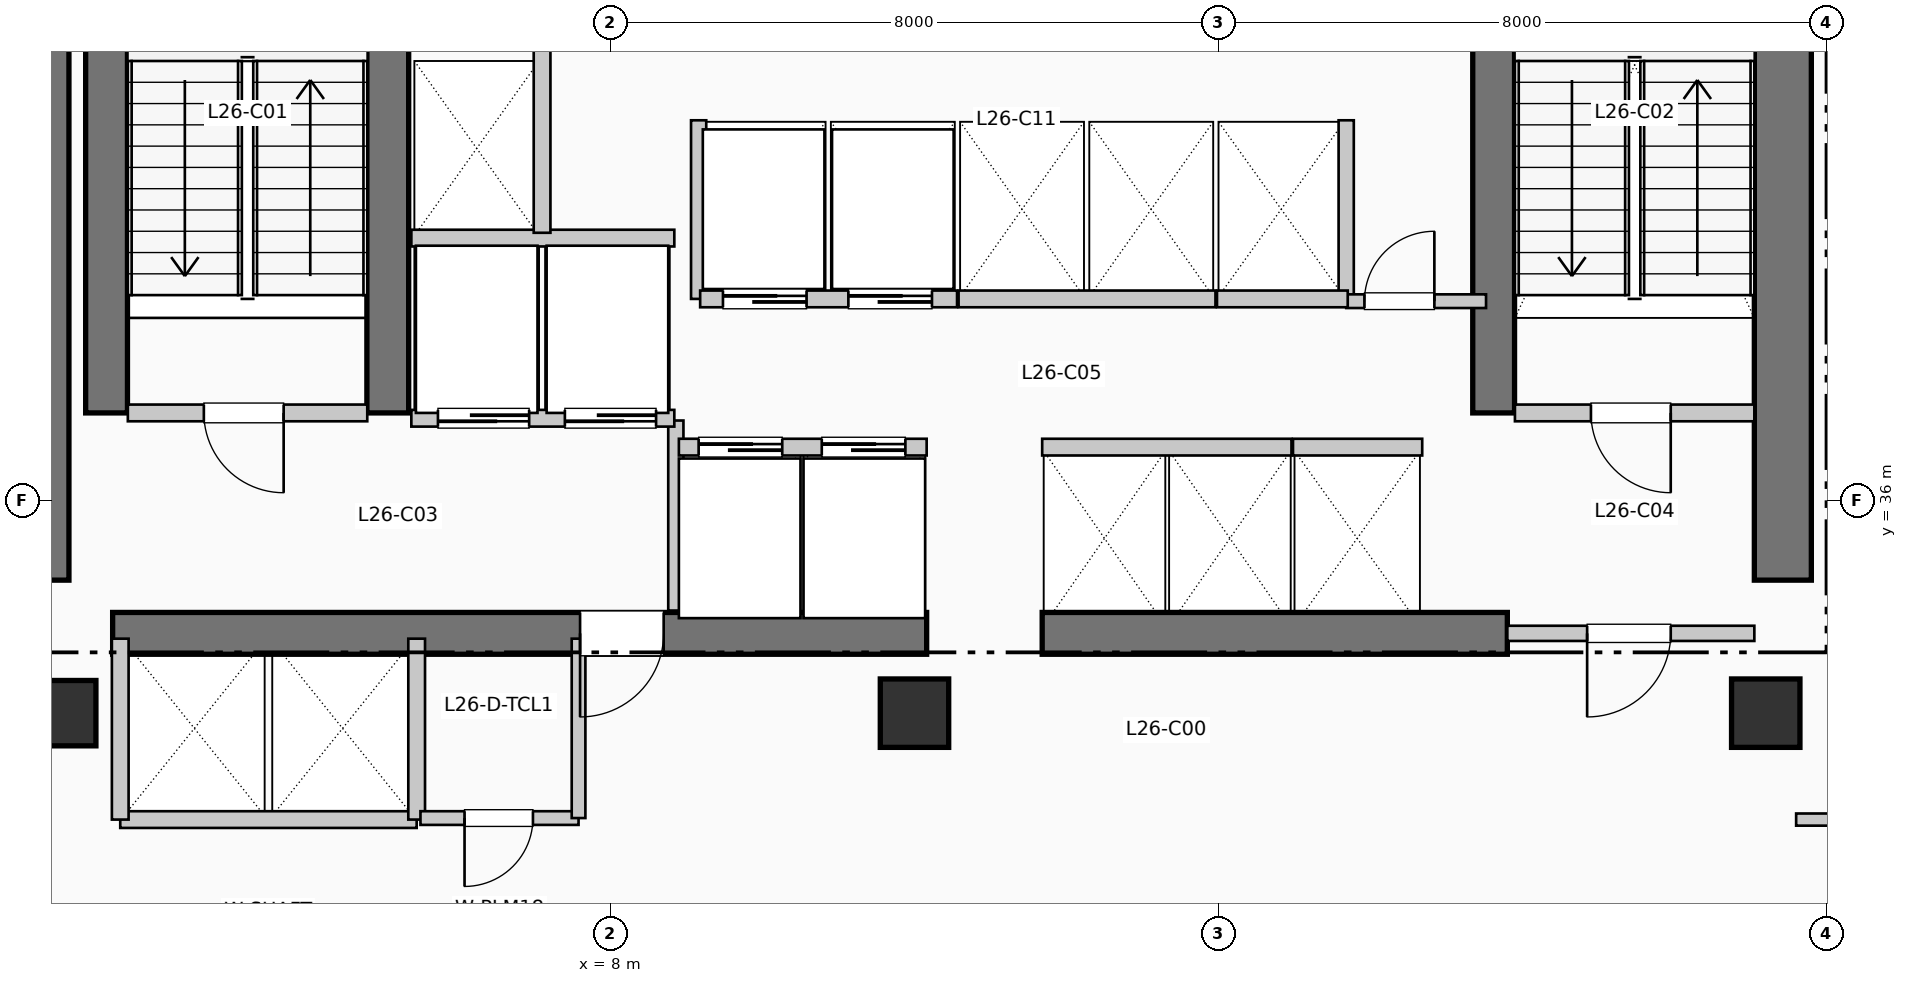
"""IFC4 building model, lengths in metres.
Left out: names, types, materials, properties, quantities, classifications, styles, units other than length and angle.
Written with IfcOpenShell. Run it as: python <this file> out.ifc"""

import sys

from ifc_helpers import new_model, si_unit, direction, frame, frame_2d, origin, origin_2d, place, context, subcontext, project, spatial, rectangle, extrude, element, fill, save


model = new_model("IFC4")
c1 = context("Model", 3, precision=1e-05, world=origin(), true_north=direction((0.0, 1.0)))
c2 = subcontext(c1, "Body", "Model", "MODEL_VIEW")
j1 = project(units=[si_unit("LENGTHUNIT", "METRE"), si_unit("PLANEANGLEUNIT", "RADIAN")], contexts=[c1])
p1 = place(None, origin())
s1 = spatial("IfcSite", under=j1, at=p1, CompositionType="ELEMENT")
p2 = place(p1, origin())
s2 = spatial("IfcBuilding", under=s1, at=p2, CompositionType="ELEMENT")
p3 = place(p2, frame((0.0, 0.0, 110.55)))
s3 = spatial("IfcBuildingStorey", under=s2, at=p3, CompositionType="ELEMENT", Elevation=110.55)
p4 = place(p3, frame((0.5, 34.95, 0.0), z_axis=(0.0, 0.0, 1.0), x_axis=(0.0, 1.0, 0.0)))
e1 = element("IfcWall", 1, at=p4, inside=s3, PredefinedType="SHEAR", context=c2, shape_type="SweptSolid", body=[
    extrude(rectangle(XDim=7.9, YDim=0.75, at=frame_2d((3.95, 0.0))), origin(), (0.0, 0.0, 1.0), 3.96),
])
p5 = place(p3, frame((23.425, 34.95, 0.0), z_axis=(0.0, 0.0, 1.0), x_axis=(0.0, 1.0, 0.0)))
e2 = element("IfcWall", 2, at=p5, inside=s3, PredefinedType="SHEAR", context=c2, shape_type="SweptSolid", body=[
    extrude(rectangle(XDim=10.64, YDim=0.75, at=frame_2d((5.32, 0.0))), origin(), (0.0, 0.0, 1.0), 3.96),
])
p6 = place(p3, frame((1.45, 34.25, 0.0), z_axis=(0.0, 0.0, 1.0), x_axis=(1.0, 0.0, 0.0)))
e3 = element("IfcWall", 3, at=p6, inside=s3, PredefinedType="SHEAR", context=c2, shape_type="SweptSolid", body=[
    extrude(rectangle(XDim=10.71, YDim=0.55, at=frame_2d((5.355, 0.0))), origin(), (0.0, 0.0, 1.0), 3.96),
])
p7 = place(p6, frame((7.25, 0.0, 0.0), z_axis=(0.0, 0.0, 1.0), x_axis=(-1.0, 0.0, 0.0)))
e4 = element("IfcOpeningElement", 4, at=p7, cuts=e3, PredefinedType="OPENING", context=c2, shape_type="SweptSolid", body=[
    extrude(rectangle(XDim=1.1, YDim=2.15, at=frame_2d((0.55, 1.075))), frame((0.0, 0.285, 0.0), z_axis=(0.0, -1.0, 0.0), x_axis=(1.0, 0.0, 0.0)), (0.0, 0.0, 1.0), 0.57),
])
p8 = place(p3, frame((13.68, 34.25, 0.0), z_axis=(0.0, 0.0, 1.0), x_axis=(1.0, 0.0, 0.0)))
e5 = element("IfcWall", 5, at=p8, inside=s3, PredefinedType="SHEAR", context=c2, shape_type="SweptSolid", body=[
    extrude(rectangle(XDim=6.12, YDim=0.55, at=frame_2d((3.06, 0.0))), origin(), (0.0, 0.0, 1.0), 3.96),
])
for number, where, z_axis, x_axis in (
    (6, (1.37, 37.15, 0.0), (0.0, 0.0, 1.0), (0.0, 1.0, 0.0)),
    (7, (5.07, 37.15, 0.0), (0.0, 0.0, 1.0), (0.0, 1.0, 0.0)),
    (8, (19.62, 37.15, 0.0), (0.0, 0.0, 1.0), (0.0, 1.0, 0.0)),
):
    element("IfcWall", number, at=place(p3, frame(where, z_axis=z_axis, x_axis=x_axis)), inside=s3, PredefinedType="SHEAR", context=c2, shape_type="SweptSolid", body=[
        extrude(rectangle(XDim=7.89, YDim=0.55, at=frame_2d((3.945, 0.0))), origin(), (0.0, 0.0, 1.0), 3.96),
    ])
p9 = place(p3, frame((0.8, 33.2, 0.0), z_axis=(0.0, 0.0, 1.0), x_axis=(1.0, 0.0, 0.0)))
e9 = element("IfcColumn", 9, at=p9, inside=s3, PredefinedType="COLUMN", context=c2, shape_type="SweptSolid", body=[
    extrude(rectangle(XDim=0.86, YDim=0.86, at=origin_2d()), origin(), (0.0, 0.0, 1.0), 3.96),
])
for number, where, z_axis, x_axis in (
    (10, (12.0, 33.2, 0.0), (0.0, 0.0, 1.0), (1.0, 0.0, 0.0)),
    (11, (23.2, 33.2, 0.0), (0.0, 0.0, 1.0), (1.0, 0.0, 0.0)),
):
    element("IfcColumn", number, at=place(p3, frame(where, z_axis=z_axis, x_axis=x_axis)), inside=s3, PredefinedType="COLUMN", context=c2, shape_type="SweptSolid", body=[
        extrude(rectangle(XDim=0.9, YDim=0.9, at=origin_2d()), origin(), (0.0, 0.0, 1.0), 3.96),
    ])
p10 = place(p3, frame((1.65, 37.15, 0.0), z_axis=(0.0, 0.0, 1.0), x_axis=(1.0, 0.0, 0.0)))
e12 = element("IfcWall", 12, at=p10, inside=s3, PredefinedType="PARTITIONING", context=c2, shape_type="SweptSolid", body=[
    extrude(rectangle(XDim=3.15, YDim=0.22, at=frame_2d((1.575, 0.0))), origin(), (0.0, 0.0, 1.0), 3.71),
])
p11 = place(p10, frame((2.05, 0.0, 0.0), z_axis=(0.0, 0.0, 1.0), x_axis=(-1.0, 0.0, 0.0)))
e13 = element("IfcOpeningElement", 13, at=p11, cuts=e12, PredefinedType="OPENING", context=c2, shape_type="SweptSolid", body=[
    extrude(rectangle(XDim=1.05, YDim=2.15, at=frame_2d((0.525, 1.075))), frame((0.0, 0.12, 0.0), z_axis=(0.0, -1.0, 0.0), x_axis=(1.0, 0.0, 0.0)), (0.0, 0.0, 1.0), 0.24),
])
p12 = place(p3, frame((8.86, 34.55, 0.0), z_axis=(0.0, 0.0, 1.0), x_axis=(0.0, 1.0, 0.0)))
e14 = element("IfcWall", 14, at=p12, inside=s3, PredefinedType="PARTITIONING", context=c2, shape_type="SweptSolid", body=[
    extrude(rectangle(XDim=2.5, YDim=0.2, at=frame_2d((1.25, 0.0))), origin(), (0.0, 0.0, 1.0), 3.71),
])
p13 = place(p3, frame((19.9, 37.15, 0.0), z_axis=(0.0, 0.0, 1.0), x_axis=(1.0, 0.0, 0.0)))
e15 = element("IfcWall", 15, at=p13, inside=s3, PredefinedType="PARTITIONING", context=c2, shape_type="SweptSolid", body=[
    extrude(rectangle(XDim=3.15, YDim=0.22, at=frame_2d((1.575, 0.0))), origin(), (0.0, 0.0, 1.0), 3.71),
])
p14 = place(p13, frame((2.05, 0.0, 0.0), z_axis=(0.0, 0.0, 1.0), x_axis=(-1.0, 0.0, 0.0)))
e16 = element("IfcOpeningElement", 16, at=p14, cuts=e15, PredefinedType="OPENING", context=c2, shape_type="SweptSolid", body=[
    extrude(rectangle(XDim=1.05, YDim=2.15, at=frame_2d((0.525, 1.075))), frame((0.0, 0.12, 0.0), z_axis=(0.0, -1.0, 0.0), x_axis=(1.0, 0.0, 0.0)), (0.0, 0.0, 1.0), 0.24),
])
p15 = place(p3, frame((19.8, 34.25, 0.0), z_axis=(0.0, 0.0, 1.0), x_axis=(1.0, 0.0, 0.0)))
e17 = element("IfcWall", 17, at=p15, inside=s3, PredefinedType="PARTITIONING", context=c2, shape_type="SweptSolid", body=[
    extrude(rectangle(XDim=3.25, YDim=0.2, at=frame_2d((1.625, 0.0))), origin(), (0.0, 0.0, 1.0), 3.71),
])
p16 = place(p15, frame((2.15, 0.0, 0.0), z_axis=(0.0, 0.0, 1.0), x_axis=(-1.0, 0.0, 0.0)))
e18 = element("IfcOpeningElement", 18, at=p16, cuts=e17, PredefinedType="OPENING", context=c2, shape_type="SweptSolid", body=[
    extrude(rectangle(XDim=1.1, YDim=2.15, at=frame_2d((0.55, 1.075))), frame((0.0, 0.11, 0.0), z_axis=(0.0, -1.0, 0.0), x_axis=(1.0, 0.0, 0.0)), (0.0, 0.0, 1.0), 0.22),
])
p17 = place(p3, frame((5.38, 37.08, 0.0), z_axis=(0.0, 0.0, 1.0), x_axis=(1.0, 0.0, 0.0)))
e19 = element("IfcWall", 19, at=p17, inside=s3, PredefinedType="PARTITIONING", context=c2, shape_type="SweptSolid", body=[
    extrude(rectangle(XDim=3.46, YDim=0.22, at=frame_2d((1.73, 0.0))), origin(), (0.0, 0.0, 1.0), 3.71),
])
p18 = place(p17, frame((1.55, 0.0, 0.0), z_axis=(0.0, 0.0, 1.0), x_axis=(-1.0, 0.0, 0.0)))
e20 = element("IfcOpeningElement", 20, at=p18, cuts=e19, PredefinedType="OPENING", context=c2, shape_type="SweptSolid", body=[
    extrude(rectangle(XDim=1.2, YDim=2.2, at=frame_2d((0.6, 1.1))), frame((0.0, 0.12, 0.0), z_axis=(0.0, -1.0, 0.0), x_axis=(1.0, 0.0, 0.0)), (0.0, 0.0, 1.0), 0.24),
])
p19 = place(p17, frame((3.22, 0.0, 0.0), z_axis=(0.0, 0.0, 1.0), x_axis=(-1.0, 0.0, 0.0)))
e21 = element("IfcOpeningElement", 21, at=p19, cuts=e19, PredefinedType="OPENING", context=c2, shape_type="SweptSolid", body=[
    extrude(rectangle(XDim=1.2, YDim=2.2, at=frame_2d((0.6, 1.1))), frame((0.0, 0.12, 0.0), z_axis=(0.0, -1.0, 0.0), x_axis=(1.0, 0.0, 0.0)), (0.0, 0.0, 1.0), 0.24),
])
p20 = place(p3, frame((5.38, 39.45, 0.0), z_axis=(0.0, 0.0, 1.0), x_axis=(1.0, 0.0, 0.0)))
e22 = element("IfcWall", 22, at=p20, inside=s3, PredefinedType="PARTITIONING", context=c2, shape_type="SweptSolid", body=[
    extrude(rectangle(XDim=3.46, YDim=0.22, at=frame_2d((1.73, 0.0))), origin(), (0.0, 0.0, 1.0), 3.71),
])
p21 = place(p3, frame((7.1, 39.52, 0.0), z_axis=(0.0, 0.0, 1.0), x_axis=(0.0, 1.0, 0.0)))
e23 = element("IfcWall", 23, at=p21, inside=s3, PredefinedType="PARTITIONING", context=c2, shape_type="SweptSolid", body=[
    extrude(rectangle(XDim=2.93, YDim=0.22, at=frame_2d((1.465, 0.0))), origin(), (0.0, 0.0, 1.0), 3.71),
])
p22 = place(p3, frame((1.55, 31.8, 0.0), z_axis=(0.0, 0.0, 1.0), x_axis=(1.0, 0.0, 0.0)))
e24 = element("IfcWall", 24, at=p22, inside=s3, PredefinedType="PARTITIONING", context=c2, shape_type="SweptSolid", body=[
    extrude(rectangle(XDim=3.9, YDim=0.22, at=frame_2d((1.95, 0.0))), origin(), (0.0, 0.0, 1.0), 3.71),
])
for number, where, z_axis, x_axis in (
    (25, (1.55, 31.8, 0.0), (0.0, 0.0, 1.0), (0.0, 1.0, 0.0)),
    (26, (5.45, 31.8, 0.0), (0.0, 0.0, 1.0), (0.0, 1.0, 0.0)),
):
    element("IfcWall", number, at=place(p3, frame(where, z_axis=z_axis, x_axis=x_axis)), inside=s3, PredefinedType="PARTITIONING", context=c2, shape_type="SweptSolid", body=[
        extrude(rectangle(XDim=2.38, YDim=0.22, at=frame_2d((1.19, 0.0))), origin(), (0.0, 0.0, 1.0), 3.71),
    ])
for number, where, z_axis, x_axis in (
    (27, (9.16, 38.65, 0.0), (0.0, 0.0, 1.0), (0.0, 1.0, 0.0)),
    (28, (17.68, 38.65, 0.0), (0.0, 0.0, 1.0), (0.0, 1.0, 0.0)),
):
    element("IfcWall", number, at=place(p3, frame(where, z_axis=z_axis, x_axis=x_axis)), inside=s3, PredefinedType="PARTITIONING", context=c2, shape_type="SweptSolid", body=[
        extrude(rectangle(XDim=2.35, YDim=0.2, at=frame_2d((1.175, 0.0))), origin(), (0.0, 0.0, 1.0), 3.71),
    ])
p23 = place(p3, frame((17.68, 38.62, 0.0), z_axis=(0.0, 0.0, 1.0), x_axis=(1.0, 0.0, 0.0)))
e29 = element("IfcWall", 29, at=p23, inside=s3, PredefinedType="PARTITIONING", context=c2, shape_type="SweptSolid", body=[
    extrude(rectangle(XDim=1.84, YDim=0.18, at=frame_2d((0.92, 0.0))), origin(), (0.0, 0.0, 1.0), 3.71),
])
p24 = place(p23, frame((0.24, 0.0, 0.0)))
e30 = element("IfcOpeningElement", 30, at=p24, cuts=e29, PredefinedType="OPENING", context=c2, shape_type="SweptSolid", body=[
    extrude(rectangle(XDim=0.92, YDim=2.1, at=frame_2d((0.46, 1.05))), frame((0.0, 0.1, 0.0), z_axis=(0.0, -1.0, 0.0), x_axis=(1.0, 0.0, 0.0)), (0.0, 0.0, 1.0), 0.2),
])
p25 = place(p3, frame((5.5, 31.82, 0.0), z_axis=(0.0, 0.0, 1.0), x_axis=(1.0, 0.0, 0.0)))
e31 = element("IfcWall", 31, at=p25, inside=s3, PredefinedType="PLUMBINGWALL", context=c2, shape_type="SweptSolid", body=[
    extrude(rectangle(XDim=2.08, YDim=0.18, at=frame_2d((1.04, 0.0))), origin(), (0.0, 0.0, 1.0), 3.71),
])
p26 = place(p25, frame((1.48, 0.0, 0.0), z_axis=(0.0, 0.0, 1.0), x_axis=(-1.0, 0.0, 0.0)))
e32 = element("IfcOpeningElement", 32, at=p26, cuts=e31, PredefinedType="OPENING", context=c2, shape_type="SweptSolid", body=[
    extrude(rectangle(XDim=0.9, YDim=2.1, at=frame_2d((0.45, 1.05))), frame((0.0, 0.1, 0.0), z_axis=(0.0, -1.0, 0.0), x_axis=(1.0, 0.0, 0.0)), (0.0, 0.0, 1.0), 0.2),
])
p27 = place(p3, frame((7.58, 31.82, 0.0), z_axis=(0.0, 0.0, 1.0), x_axis=(0.0, 1.0, 0.0)))
e33 = element("IfcWall", 33, at=p27, inside=s3, PredefinedType="PLUMBINGWALL", context=c2, shape_type="SweptSolid", body=[
    extrude(rectangle(XDim=2.36, YDim=0.18, at=frame_2d((1.18, 0.0))), origin(), (0.0, 0.0, 1.0), 3.71),
])
p28 = place(p3, frame((8.9, 36.7, 0.0), z_axis=(0.0, 0.0, 1.0), x_axis=(1.0, 0.0, 0.0)))
e34 = element("IfcWall", 34, at=p28, inside=s3, PredefinedType="PARTITIONING", context=c2, shape_type="SweptSolid", body=[
    extrude(rectangle(XDim=3.26, YDim=0.22, at=frame_2d((1.63, 0.0))), origin(), (0.0, 0.0, 1.0), 3.71),
])
p29 = place(p28, frame((0.26, 0.0, 0.0)))
e35 = element("IfcOpeningElement", 35, at=p29, cuts=e34, PredefinedType="OPENING", context=c2, shape_type="SweptSolid", body=[
    extrude(rectangle(XDim=1.1, YDim=2.2, at=frame_2d((0.55, 1.1))), frame((0.0, 0.12, 0.0), z_axis=(0.0, -1.0, 0.0), x_axis=(1.0, 0.0, 0.0)), (0.0, 0.0, 1.0), 0.24),
])
p30 = place(p28, frame((1.88, 0.0, 0.0)))
e36 = element("IfcOpeningElement", 36, at=p30, cuts=e34, PredefinedType="OPENING", context=c2, shape_type="SweptSolid", body=[
    extrude(rectangle(XDim=1.1, YDim=2.2, at=frame_2d((0.55, 1.1))), frame((0.0, 0.12, 0.0), z_axis=(0.0, -1.0, 0.0), x_axis=(1.0, 0.0, 0.0)), (0.0, 0.0, 1.0), 0.24),
])
p31 = place(p3, frame((9.18, 38.65, 0.0), z_axis=(0.0, 0.0, 1.0), x_axis=(1.0, 0.0, 0.0)))
e37 = element("IfcWall", 37, at=p31, inside=s3, PredefinedType="PARTITIONING", context=c2, shape_type="SweptSolid", body=[
    extrude(rectangle(XDim=3.38, YDim=0.22, at=frame_2d((1.69, 0.0))), origin(), (0.0, 0.0, 1.0), 3.71),
])
p32 = place(p31, frame((0.3, 0.0, 0.0)))
e38 = element("IfcOpeningElement", 38, at=p32, cuts=e37, PredefinedType="OPENING", context=c2, shape_type="SweptSolid", body=[
    extrude(rectangle(XDim=1.1, YDim=2.2, at=frame_2d((0.55, 1.1))), frame((0.0, 0.12, 0.0), z_axis=(0.0, -1.0, 0.0), x_axis=(1.0, 0.0, 0.0)), (0.0, 0.0, 1.0), 0.24),
])
p33 = place(p31, frame((1.95, 0.0, 0.0)))
e39 = element("IfcOpeningElement", 39, at=p33, cuts=e37, PredefinedType="OPENING", context=c2, shape_type="SweptSolid", body=[
    extrude(rectangle(XDim=1.1, YDim=2.2, at=frame_2d((0.55, 1.1))), frame((0.0, 0.12, 0.0), z_axis=(0.0, -1.0, 0.0), x_axis=(1.0, 0.0, 0.0)), (0.0, 0.0, 1.0), 0.24),
])
p34 = place(p3, frame((13.68, 36.7, 0.0), z_axis=(0.0, 0.0, 1.0), x_axis=(1.0, 0.0, 0.0)))
e40 = element("IfcWall", 40, at=p34, inside=s3, PredefinedType="PARTITIONING", context=c2, shape_type="SweptSolid", body=[
    extrude(rectangle(XDim=3.28, YDim=0.22, at=frame_2d((1.64, 0.0))), origin(), (0.0, 0.0, 1.0), 3.71),
])
p35 = place(p3, frame((12.58, 38.65, 0.0), z_axis=(0.0, 0.0, 1.0), x_axis=(1.0, 0.0, 0.0)))
e41 = element("IfcWall", 41, at=p35, inside=s3, PredefinedType="PARTITIONING", context=c2, shape_type="SweptSolid", body=[
    extrude(rectangle(XDim=3.38, YDim=0.22, at=frame_2d((1.69, 0.0))), origin(), (0.0, 0.0, 1.0), 3.71),
])
p36 = place(p3, frame((16.98, 36.7, 0.0), z_axis=(0.0, 0.0, 1.0), x_axis=(1.0, 0.0, 0.0)))
e42 = element("IfcWall", 42, at=p36, inside=s3, PredefinedType="PARTITIONING", context=c2, shape_type="SweptSolid", body=[
    extrude(rectangle(XDim=1.7, YDim=0.22, at=frame_2d((0.85, 0.0))), origin(), (0.0, 0.0, 1.0), 3.71),
])
p37 = place(p3, frame((15.98, 38.65, 0.0), z_axis=(0.0, 0.0, 1.0), x_axis=(1.0, 0.0, 0.0)))
e43 = element("IfcWall", 43, at=p37, inside=s3, PredefinedType="PARTITIONING", context=c2, shape_type="SweptSolid", body=[
    extrude(rectangle(XDim=1.72, YDim=0.22, at=frame_2d((0.86, 0.0))), origin(), (0.0, 0.0, 1.0), 3.71),
])
p38 = place(p3, frame((23.6, 31.8, 0.0), z_axis=(0.0, 0.0, 1.0), x_axis=(1.0, 0.0, 0.0)))
e44 = element("IfcWall", 44, at=p38, inside=s3, PredefinedType="PARTITIONING", context=c2, shape_type="SweptSolid", body=[
    extrude(rectangle(XDim=26.41, YDim=0.16, at=frame_2d((13.205, 0.0))), origin(), (0.0, 0.0, 1.0), 3.71),
])
p39 = place(p38, frame((12.73, 0.0, 0.0)))
e45 = element("IfcOpeningElement", 45, at=p39, cuts=e44, PredefinedType="OPENING", context=c2, shape_type="SweptSolid", body=[
    extrude(rectangle(XDim=0.95, YDim=2.15, at=frame_2d((0.475, 1.075))), frame((0.0, 0.09, 0.0), z_axis=(0.0, -1.0, 0.0), x_axis=(1.0, 0.0, 0.0)), (0.0, 0.0, 1.0), 0.18),
])
p40 = place(p11, origin())
e46 = element("IfcDoor", 46, at=p40, inside=s3, OperationType="SINGLE_SWING_RIGHT", PredefinedType="DOOR", context=c2, shape_type="SweptSolid", body=[
    extrude(rectangle(XDim=1.05, YDim=2.15, at=frame_2d((0.525, 1.075))), frame((0.0, 0.025, 0.0), z_axis=(0.0, -1.0, 0.0), x_axis=(1.0, 0.0, 0.0)), (0.0, 0.0, 1.0), 0.05),
])
fill(e13, e46)
p41 = place(p7, origin())
e47 = element("IfcDoor", 47, at=p41, inside=s3, OperationType="SINGLE_SWING_LEFT", PredefinedType="DOOR", context=c2, shape_type="SweptSolid", body=[
    extrude(rectangle(XDim=1.1, YDim=2.15, at=frame_2d((0.55, 1.075))), frame((0.0, 0.025, 0.0), z_axis=(0.0, -1.0, 0.0), x_axis=(1.0, 0.0, 0.0)), (0.0, 0.0, 1.0), 0.05),
])
fill(e4, e47)
p42 = place(p14, origin())
e48 = element("IfcDoor", 48, at=p42, inside=s3, OperationType="SINGLE_SWING_RIGHT", PredefinedType="DOOR", context=c2, shape_type="SweptSolid", body=[
    extrude(rectangle(XDim=1.05, YDim=2.15, at=frame_2d((0.525, 1.075))), frame((0.0, 0.025, 0.0), z_axis=(0.0, -1.0, 0.0), x_axis=(1.0, 0.0, 0.0)), (0.0, 0.0, 1.0), 0.05),
])
fill(e16, e48)
p43 = place(p16, origin())
e49 = element("IfcDoor", 49, at=p43, inside=s3, OperationType="SINGLE_SWING_LEFT", PredefinedType="DOOR", context=c2, shape_type="SweptSolid", body=[
    extrude(rectangle(XDim=1.1, YDim=2.15, at=frame_2d((0.55, 1.075))), frame((0.0, 0.025, 0.0), z_axis=(0.0, -1.0, 0.0), x_axis=(1.0, 0.0, 0.0)), (0.0, 0.0, 1.0), 0.05),
])
fill(e18, e49)
p44 = place(p18, origin())
e50 = element("IfcDoor", 50, at=p44, inside=s3, OperationType="SLIDING_TO_RIGHT", PredefinedType="DOOR", context=c2, shape_type="SweptSolid", body=[
    extrude(rectangle(XDim=1.2, YDim=2.2, at=frame_2d((0.6, 1.1))), frame((0.0, 0.025, 0.0), z_axis=(0.0, -1.0, 0.0), x_axis=(1.0, 0.0, 0.0)), (0.0, 0.0, 1.0), 0.05),
])
fill(e20, e50)
p45 = place(p19, origin())
e51 = element("IfcDoor", 51, at=p45, inside=s3, OperationType="SLIDING_TO_RIGHT", PredefinedType="DOOR", context=c2, shape_type="SweptSolid", body=[
    extrude(rectangle(XDim=1.2, YDim=2.2, at=frame_2d((0.6, 1.1))), frame((0.0, 0.025, 0.0), z_axis=(0.0, -1.0, 0.0), x_axis=(1.0, 0.0, 0.0)), (0.0, 0.0, 1.0), 0.05),
])
fill(e21, e51)
p46 = place(p24, origin())
e52 = element("IfcDoor", 52, at=p46, inside=s3, OperationType="SINGLE_SWING_RIGHT", PredefinedType="DOOR", context=c2, shape_type="SweptSolid", body=[
    extrude(rectangle(XDim=0.92, YDim=2.1, at=frame_2d((0.46, 1.05))), frame((0.0, 0.025, 0.0), z_axis=(0.0, -1.0, 0.0), x_axis=(1.0, 0.0, 0.0)), (0.0, 0.0, 1.0), 0.05),
])
fill(e30, e52)
p47 = place(p26, origin())
e53 = element("IfcDoor", 53, at=p47, inside=s3, OperationType="SINGLE_SWING_LEFT", PredefinedType="DOOR", context=c2, shape_type="SweptSolid", body=[
    extrude(rectangle(XDim=0.9, YDim=2.1, at=frame_2d((0.45, 1.05))), frame((0.0, 0.025, 0.0), z_axis=(0.0, -1.0, 0.0), x_axis=(1.0, 0.0, 0.0)), (0.0, 0.0, 1.0), 0.05),
])
fill(e32, e53)
p48 = place(p29, origin())
e54 = element("IfcDoor", 54, at=p48, inside=s3, OperationType="SLIDING_TO_LEFT", PredefinedType="DOOR", context=c2, shape_type="SweptSolid", body=[
    extrude(rectangle(XDim=1.1, YDim=2.2, at=frame_2d((0.55, 1.1))), frame((0.0, 0.025, 0.0), z_axis=(0.0, -1.0, 0.0), x_axis=(1.0, 0.0, 0.0)), (0.0, 0.0, 1.0), 0.05),
])
fill(e35, e54)
p49 = place(p30, origin())
e55 = element("IfcDoor", 55, at=p49, inside=s3, OperationType="SLIDING_TO_LEFT", PredefinedType="DOOR", context=c2, shape_type="SweptSolid", body=[
    extrude(rectangle(XDim=1.1, YDim=2.2, at=frame_2d((0.55, 1.1))), frame((0.0, 0.025, 0.0), z_axis=(0.0, -1.0, 0.0), x_axis=(1.0, 0.0, 0.0)), (0.0, 0.0, 1.0), 0.05),
])
fill(e36, e55)
p50 = place(p32, origin())
e56 = element("IfcDoor", 56, at=p50, inside=s3, OperationType="SLIDING_TO_LEFT", PredefinedType="DOOR", context=c2, shape_type="SweptSolid", body=[
    extrude(rectangle(XDim=1.1, YDim=2.2, at=frame_2d((0.55, 1.1))), frame((0.0, 0.025, 0.0), z_axis=(0.0, -1.0, 0.0), x_axis=(1.0, 0.0, 0.0)), (0.0, 0.0, 1.0), 0.05),
])
fill(e38, e56)
p51 = place(p33, origin())
e57 = element("IfcDoor", 57, at=p51, inside=s3, OperationType="SLIDING_TO_LEFT", PredefinedType="DOOR", context=c2, shape_type="SweptSolid", body=[
    extrude(rectangle(XDim=1.1, YDim=2.2, at=frame_2d((0.55, 1.1))), frame((0.0, 0.025, 0.0), z_axis=(0.0, -1.0, 0.0), x_axis=(1.0, 0.0, 0.0)), (0.0, 0.0, 1.0), 0.05),
])
fill(e39, e57)
save(model, sys.argv[1])
